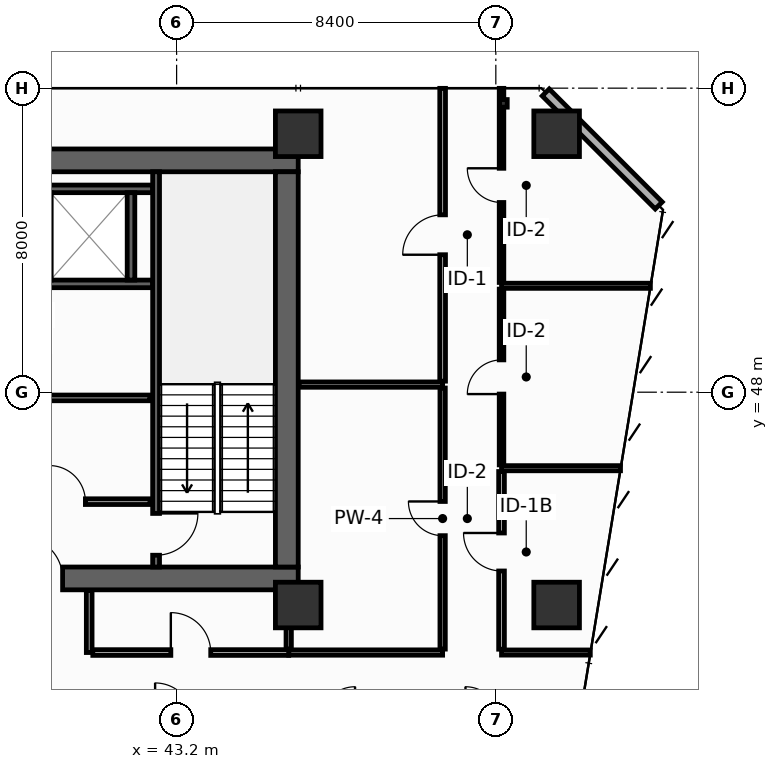
"""IFC4 building model, lengths in metres.
Left out: names, types, materials, properties, quantities, classifications, styles, units other than length and angle.
Written with IfcOpenShell. Run it as: python <this file> out.ifc"""

import sys

from ifc_helpers import new_model, si_unit, direction, frame, frame_2d, origin, origin_2d, place, context, subcontext, project, spatial, rectangle, hollow_rectangle, extrude, element, fill, save


model = new_model("IFC4")
c1 = context("Model", 3, precision=1e-05, world=origin(), true_north=direction((0.0, 1.0)))
c2 = subcontext(c1, "Body", "Model", "MODEL_VIEW")
j1 = project(units=[si_unit("LENGTHUNIT", "METRE"), si_unit("PLANEANGLEUNIT", "RADIAN")], contexts=[c1])
p1 = place(None, origin())
s1 = spatial("IfcSite", under=j1, at=p1, CompositionType="ELEMENT")
p2 = place(p1, origin())
s2 = spatial("IfcBuilding", under=s1, at=p2, CompositionType="ELEMENT")
p3 = place(p2, frame((0.0, 0.0, 56.0)))
s3 = spatial("IfcBuildingStorey", under=s2, at=p3, CompositionType="ELEMENT", Elevation=56.0)
p4 = place(p3, frame((13.5, 43.1, 0.0), z_axis=(0.0, 0.0, 1.0), x_axis=(1.0, 0.0, 0.0)))
e1 = element("IfcWall", 1, at=p4, inside=s3, PredefinedType="SHEAR", context=c2, shape_type="SweptSolid", body=[
    extrude(rectangle(XDim=32.9, YDim=0.6, at=frame_2d((16.45, 0.0))), origin(), (0.0, 0.0, 1.0), 4.15),
])
p5 = place(p4, frame((5.4, 0.0, 0.0)))
e2 = element("IfcOpeningElement", 2, at=p5, cuts=e1, PredefinedType="OPENING", context=c2, shape_type="SweptSolid", body=[
    extrude(rectangle(XDim=1.1, YDim=2.15, at=frame_2d((0.55, 1.075))), frame((0.0, 0.31, 0.0), z_axis=(0.0, -1.0, 0.0), x_axis=(1.0, 0.0, 0.0)), (0.0, 0.0, 1.0), 0.62),
])
p6 = place(p4, frame((25.6, 0.0, 0.0)))
e3 = element("IfcOpeningElement", 3, at=p6, cuts=e1, PredefinedType="OPENING", context=c2, shape_type="SweptSolid", body=[
    extrude(rectangle(XDim=1.1, YDim=2.15, at=frame_2d((0.55, 1.075))), frame((0.0, 0.31, 0.0), z_axis=(0.0, -1.0, 0.0), x_axis=(1.0, 0.0, 0.0)), (0.0, 0.0, 1.0), 0.62),
])
p7 = place(p3, frame((13.5, 54.1, 0.0), z_axis=(0.0, 0.0, 1.0), x_axis=(1.0, 0.0, 0.0)))
e4 = element("IfcWall", 4, at=p7, inside=s3, PredefinedType="SHEAR", context=c2, shape_type="SweptSolid", body=[
    extrude(rectangle(XDim=32.9, YDim=0.6, at=frame_2d((16.45, 0.0))), origin(), (0.0, 0.0, 1.0), 4.15),
])
p8 = place(p3, frame((46.1, 43.4, 0.0), z_axis=(0.0, 0.0, 1.0), x_axis=(0.0, 1.0, 0.0)))
e5 = element("IfcWall", 5, at=p8, inside=s3, PredefinedType="SHEAR", context=c2, shape_type="SweptSolid", body=[
    extrude(rectangle(XDim=10.4, YDim=0.6, at=frame_2d((5.2, 0.0))), origin(), (0.0, 0.0, 1.0), 4.15),
])
for number, where, z_axis, x_axis in (
    (6, (46.4, 54.8, 0.0), (0.0, 0.0, 1.0), (1.0, 0.0, 0.0)),
    (7, (53.2, 54.8, 0.0), (0.0, 0.0, 1.0), (1.0, 0.0, 0.0)),
    (8, (46.4, 42.4, 0.0), (0.0, 0.0, 1.0), (1.0, 0.0, 0.0)),
    (9, (53.2, 42.4, 0.0), (0.0, 0.0, 1.0), (1.0, 0.0, 0.0)),
):
    element("IfcColumn", number, at=place(p3, frame(where, z_axis=z_axis, x_axis=x_axis)), inside=s3, PredefinedType="COLUMN", context=c2, shape_type="SweptSolid", body=[
        extrude(hollow_rectangle(XDim=1.2, YDim=1.2, WallThickness=0.055, at=origin_2d()), origin(), (0.0, 0.0, 1.0), 4.4),
    ])
p9 = place(p3, frame((51.8, 55.6, 0.0), z_axis=(0.0, 0.0, 1.0), x_axis=(1.0, 0.0, 0.0)))
e10 = element("IfcColumn", 10, at=p9, inside=s3, PredefinedType="PILASTER", context=c2, shape_type="SweptSolid", body=[
    extrude(hollow_rectangle(XDim=0.2, YDim=0.2, WallThickness=0.01, at=origin_2d()), origin(), (0.0, 0.0, 1.0), 4.4),
])
for number, where, z_axis, x_axis in (
    (11, (39.525, 50.85, 0.0), (0.0, 0.0, 1.0), (1.0, 0.0, 0.0)),
    (12, (39.525, 53.35, 0.0), (0.0, 0.0, 1.0), (1.0, 0.0, 0.0)),
):
    element("IfcWall", number, at=place(p3, frame(where, z_axis=z_axis, x_axis=x_axis)), inside=s3, PredefinedType="SHEAR", context=c2, shape_type="SweptSolid", body=[
        extrude(rectangle(XDim=3.045, YDim=0.2, at=frame_2d((1.522, 0.0))), origin(), (0.0, 0.0, 1.0), 4.15),
    ])
p10 = place(p3, frame((42.0, 50.95, 0.0), z_axis=(0.0, 0.0, 1.0), x_axis=(0.0, 1.0, 0.0)))
e13 = element("IfcWall", 13, at=p10, inside=s3, PredefinedType="SHEAR", context=c2, shape_type="SweptSolid", body=[
    extrude(rectangle(XDim=2.3, YDim=0.2, at=frame_2d((1.15, 0.0))), origin(), (0.0, 0.0, 1.0), 4.15),
])
p11 = place(p3, frame((42.66, 53.8, 0.0), z_axis=(0.0, 0.0, 1.0), x_axis=(0.0, -1.0, 0.0)))
e14 = element("IfcWall", 14, at=p11, inside=s3, PredefinedType="SHEAR", context=c2, shape_type="SweptSolid", body=[
    extrude(rectangle(XDim=10.4, YDim=0.18, at=frame_2d((5.2, 0.0))), origin(), (0.0, 0.0, 1.0), 4.15),
])
p12 = place(p11, frame((8.99, 0.0, 0.0)))
e15 = element("IfcOpeningElement", 15, at=p12, cuts=e14, PredefinedType="OPENING", context=c2, shape_type="SweptSolid", body=[
    extrude(rectangle(XDim=1.1, YDim=2.15, at=frame_2d((0.55, 1.075))), frame((0.0, 0.1, 0.0), z_axis=(0.0, -1.0, 0.0), x_axis=(1.0, 0.0, 0.0)), (0.0, 0.0, 1.0), 0.2),
])
p13 = place(p3, frame((34.05, 45.12, 0.0), z_axis=(0.0, 0.0, 1.0), x_axis=(1.0, 0.0, 0.0)))
e16 = element("IfcWall", 16, at=p13, inside=s3, PredefinedType="PARTITIONING", context=c2, shape_type="SweptSolid", body=[
    extrude(rectangle(XDim=8.45, YDim=0.15, at=frame_2d((4.225, 0.0))), origin(), (0.0, 0.0, 1.0), 4.15),
])
p14 = place(p13, frame((1.5, 0.0, 0.0)))
e17 = element("IfcOpeningElement", 17, at=p14, cuts=e16, PredefinedType="OPENING", context=c2, shape_type="SweptSolid", body=[
    extrude(rectangle(XDim=0.95, YDim=2.15, at=frame_2d((0.475, 1.075))), frame((0.0, 0.085, 0.0), z_axis=(0.0, -1.0, 0.0), x_axis=(1.0, 0.0, 0.0)), (0.0, 0.0, 1.0), 0.17),
])
p15 = place(p13, frame((5.8, 0.0, 0.0)))
e18 = element("IfcOpeningElement", 18, at=p15, cuts=e16, PredefinedType="OPENING", context=c2, shape_type="SweptSolid", body=[
    extrude(rectangle(XDim=0.95, YDim=2.15, at=frame_2d((0.475, 1.075))), frame((0.0, 0.085, 0.0), z_axis=(0.0, -1.0, 0.0), x_axis=(1.0, 0.0, 0.0)), (0.0, 0.0, 1.0), 0.17),
])
p16 = place(p3, frame((34.05, 47.85, 0.0), z_axis=(0.0, 0.0, 1.0), x_axis=(1.0, 0.0, 0.0)))
e19 = element("IfcWall", 19, at=p16, inside=s3, PredefinedType="PARTITIONING", context=c2, shape_type="SweptSolid", body=[
    extrude(rectangle(XDim=8.45, YDim=0.15, at=frame_2d((4.225, 0.0))), origin(), (0.0, 0.0, 1.0), 4.15),
])
p17 = place(p3, frame((55.887, 52.913, 0.0), z_axis=(0.0, 0.0, 1.0), x_axis=(-0.707106781187, 0.707106781187, 0.0)))
e20 = element("IfcWall", 20, at=p17, inside=s3, PredefinedType="STANDARD", context=c2, shape_type="SweptSolid", body=[
    extrude(rectangle(XDim=4.206, YDim=0.26, at=frame_2d((2.103, 0.0))), origin(), (0.0, 0.0, 1.0), 4.15),
])
p18 = place(p3, frame((46.15, 41.15, 0.0), z_axis=(0.0, 0.0, 1.0), x_axis=(1.0, 0.0, 0.0)))
e21 = element("IfcWall", 21, at=p18, inside=s3, PredefinedType="PARTITIONING", context=c2, shape_type="SweptSolid", body=[
    extrude(rectangle(XDim=4.05, YDim=0.14, at=frame_2d((2.025, 0.0))), origin(), (0.0, 0.0, 1.0), 4.15),
])
p19 = place(p3, frame((46.15, 41.24, 0.0), z_axis=(0.0, 0.0, 1.0), x_axis=(0.0, 1.0, 0.0)))
e22 = element("IfcWall", 22, at=p19, inside=s3, PredefinedType="PARTITIONING", context=c2, shape_type="SweptSolid", body=[
    extrude(rectangle(XDim=1.54, YDim=0.14, at=frame_2d((0.77, 0.0))), origin(), (0.0, 0.0, 1.0), 4.15),
])
p20 = place(p3, frame((46.42, 48.2, 0.0), z_axis=(0.0, 0.0, 1.0), x_axis=(1.0, 0.0, 0.0)))
e23 = element("IfcWall", 23, at=p20, inside=s3, PredefinedType="PARTITIONING", context=c2, shape_type="SweptSolid", body=[
    extrude(rectangle(XDim=3.78, YDim=0.14, at=frame_2d((1.89, 0.0))), origin(), (0.0, 0.0, 1.0), 4.15),
])
p21 = place(p3, frame((50.2, 41.24, 0.0), z_axis=(0.0, 0.0, 1.0), x_axis=(0.0, 1.0, 0.0)))
e24 = element("IfcWall", 24, at=p21, inside=s3, PredefinedType="PARTITIONING", context=c2, shape_type="SweptSolid", body=[
    extrude(rectangle(XDim=6.87, YDim=0.14, at=frame_2d((3.435, 0.0))), origin(), (0.0, 0.0, 1.0), 3.335),
])
p22 = place(p21, frame((2.985, 0.0, 0.0)))
e25 = element("IfcOpeningElement", 25, at=p22, cuts=e24, PredefinedType="OPENING", context=c2, shape_type="SweptSolid", body=[
    extrude(rectangle(XDim=0.9, YDim=2.1, at=frame_2d((0.45, 1.05))), frame((0.0, 0.08, 0.0), z_axis=(0.0, -1.0, 0.0), x_axis=(1.0, 0.0, 0.0)), (0.0, 0.0, 1.0), 0.16),
])
p23 = place(p3, frame((50.2, 48.29, 0.0), z_axis=(0.0, 0.0, 1.0), x_axis=(0.0, 1.0, 0.0)))
e26 = element("IfcWall", 26, at=p23, inside=s3, PredefinedType="PARTITIONING", context=c2, shape_type="SweptSolid", body=[
    extrude(rectangle(XDim=7.705, YDim=0.15, at=frame_2d((3.853, 0.0))), origin(), (0.0, 0.0, 1.0), 3.435),
])
p24 = place(p23, frame((3.327, 0.0, 0.0)))
e27 = element("IfcOpeningElement", 27, at=p24, cuts=e26, PredefinedType="OPENING", context=c2, shape_type="SweptSolid", body=[
    extrude(rectangle(XDim=1.05, YDim=2.15, at=frame_2d((0.525, 1.075))), frame((0.0, 0.085, 0.0), z_axis=(0.0, -1.0, 0.0), x_axis=(1.0, 0.0, 0.0)), (0.0, 0.0, 1.0), 0.17),
])
p25 = place(p3, frame((51.75, 41.15, 0.0), z_axis=(0.0, 0.0, 1.0), x_axis=(1.0, 0.0, 0.0)))
e28 = element("IfcWall", 28, at=p25, inside=s3, PredefinedType="PARTITIONING", context=c2, shape_type="SweptSolid", body=[
    extrude(rectangle(XDim=2.336, YDim=0.135, at=frame_2d((1.168, 0.0))), origin(), (0.0, 0.0, 1.0), 3.635),
])
p26 = place(p3, frame((51.75, 46.0, 0.0), z_axis=(0.0, 0.0, 1.0), x_axis=(1.0, 0.0, 0.0)))
e29 = element("IfcWall", 29, at=p26, inside=s3, PredefinedType="PARTITIONING", context=c2, shape_type="SweptSolid", body=[
    extrude(rectangle(XDim=3.131, YDim=0.135, at=frame_2d((1.565, 0.0))), origin(), (0.0, 0.0, 1.0), 3.335),
])
p27 = place(p3, frame((51.75, 50.8, 0.0), z_axis=(0.0, 0.0, 1.0), x_axis=(1.0, 0.0, 0.0)))
e30 = element("IfcWall", 30, at=p27, inside=s3, PredefinedType="PARTITIONING", context=c2, shape_type="SweptSolid", body=[
    extrude(rectangle(XDim=3.917, YDim=0.135, at=frame_2d((1.958, 0.0))), origin(), (0.0, 0.0, 1.0), 3.335),
])
p28 = place(p3, frame((51.75, 41.238, 0.0), z_axis=(0.0, 0.0, 1.0), x_axis=(0.0, 1.0, 0.0)))
e31 = element("IfcWall", 31, at=p28, inside=s3, PredefinedType="PARTITIONING", context=c2, shape_type="SweptSolid", body=[
    extrude(rectangle(XDim=4.675, YDim=0.15, at=frame_2d((2.337, 0.0))), origin(), (0.0, 0.0, 1.0), 3.335),
])
p29 = place(p28, frame((2.058, 0.0, 0.0)))
e32 = element("IfcOpeningElement", 32, at=p29, cuts=e31, PredefinedType="OPENING", context=c2, shape_type="SweptSolid", body=[
    extrude(rectangle(XDim=1.0, YDim=2.15, at=frame_2d((0.5, 1.075))), frame((0.0, 0.085, 0.0), z_axis=(0.0, -1.0, 0.0), x_axis=(1.0, 0.0, 0.0)), (0.0, 0.0, 1.0), 0.17),
])
p30 = place(p3, frame((51.75, 46.087, 0.0), z_axis=(0.0, 0.0, 1.0), x_axis=(0.0, 1.0, 0.0)))
e33 = element("IfcWall", 33, at=p30, inside=s3, PredefinedType="PARTITIONING", context=c2, shape_type="SweptSolid", body=[
    extrude(rectangle(XDim=4.625, YDim=0.12, at=frame_2d((2.312, 0.0))), origin(), (0.0, 0.0, 1.0), 4.15),
])
p31 = place(p30, frame((1.863, 0.0, 0.0)))
e34 = element("IfcOpeningElement", 34, at=p31, cuts=e33, PredefinedType="OPENING", context=c2, shape_type="SweptSolid", body=[
    extrude(rectangle(XDim=0.9, YDim=2.1, at=frame_2d((0.45, 1.05))), frame((0.0, 0.07, 0.0), z_axis=(0.0, -1.0, 0.0), x_axis=(1.0, 0.0, 0.0)), (0.0, 0.0, 1.0), 0.14),
])
p32 = place(p3, frame((51.75, 50.887, 0.0), z_axis=(0.0, 0.0, 1.0), x_axis=(0.0, 1.0, 0.0)))
e35 = element("IfcWall", 35, at=p32, inside=s3, PredefinedType="PARTITIONING", context=c2, shape_type="SweptSolid", body=[
    extrude(rectangle(XDim=5.108, YDim=0.12, at=frame_2d((2.554, 0.0))), origin(), (0.0, 0.0, 1.0), 3.435),
])
p33 = place(p32, frame((2.104, 0.0, 0.0)))
e36 = element("IfcOpeningElement", 36, at=p33, cuts=e35, PredefinedType="OPENING", context=c2, shape_type="SweptSolid", body=[
    extrude(rectangle(XDim=0.9, YDim=2.1, at=frame_2d((0.45, 1.05))), frame((0.0, 0.07, 0.0), z_axis=(0.0, -1.0, 0.0), x_axis=(1.0, 0.0, 0.0)), (0.0, 0.0, 1.0), 0.14),
])
p34 = place(p3, frame((40.9, 41.15, 0.0), z_axis=(0.0, 0.0, 1.0), x_axis=(0.0, 1.0, 0.0)))
e37 = element("IfcWall", 37, at=p34, inside=s3, PredefinedType="PARTITIONING", context=c2, shape_type="SweptSolid", body=[
    extrude(rectangle(XDim=1.63, YDim=0.15, at=frame_2d((0.815, 0.0))), origin(), (0.0, 0.0, 1.0), 4.15),
])
p35 = place(p3, frame((40.995, 41.15, 0.0), z_axis=(0.0, 0.0, 1.0), x_axis=(1.0, 0.0, 0.0)))
e38 = element("IfcWall", 38, at=p35, inside=s3, PredefinedType="PARTITIONING", context=c2, shape_type="SweptSolid", body=[
    extrude(rectangle(XDim=5.155, YDim=0.15, at=frame_2d((2.577, 0.0))), origin(), (0.0, 0.0, 1.0), 4.15),
])
p36 = place(p35, frame((2.053, 0.0, 0.0)))
e39 = element("IfcOpeningElement", 39, at=p36, cuts=e38, PredefinedType="OPENING", context=c2, shape_type="SweptSolid", body=[
    extrude(rectangle(XDim=1.05, YDim=2.15, at=frame_2d((0.525, 1.075))), frame((0.0, 0.085, 0.0), z_axis=(0.0, -1.0, 0.0), x_axis=(1.0, 0.0, 0.0)), (0.0, 0.0, 1.0), 0.17),
])
p37 = place(p12, origin())
e40 = element("IfcDoor", 40, at=p37, inside=s3, OperationType="SINGLE_SWING_LEFT", PredefinedType="DOOR", context=c2, shape_type="SweptSolid", body=[
    extrude(rectangle(XDim=1.1, YDim=2.15, at=frame_2d((0.55, 1.075))), frame((0.0, 0.025, 0.0), z_axis=(0.0, -1.0, 0.0), x_axis=(1.0, 0.0, 0.0)), (0.0, 0.0, 1.0), 0.05),
])
fill(e15, e40)
p38 = place(p6, origin())
e41 = element("IfcDoor", 41, at=p38, inside=s3, OperationType="SINGLE_SWING_LEFT", PredefinedType="DOOR", context=c2, shape_type="SweptSolid", body=[
    extrude(rectangle(XDim=1.1, YDim=2.15, at=frame_2d((0.55, 1.075))), frame((0.0, 0.025, 0.0), z_axis=(0.0, -1.0, 0.0), x_axis=(1.0, 0.0, 0.0)), (0.0, 0.0, 1.0), 0.05),
])
fill(e3, e41)
p39 = place(p15, origin())
e42 = element("IfcDoor", 42, at=p39, inside=s3, OperationType="SINGLE_SWING_LEFT", PredefinedType="DOOR", context=c2, shape_type="SweptSolid", body=[
    extrude(rectangle(XDim=0.95, YDim=2.15, at=frame_2d((0.475, 1.075))), frame((0.0, 0.025, 0.0), z_axis=(0.0, -1.0, 0.0), x_axis=(1.0, 0.0, 0.0)), (0.0, 0.0, 1.0), 0.05),
])
fill(e18, e42)
p40 = place(p22, origin())
e43 = element("IfcDoor", 43, at=p40, inside=s3, OperationType="SINGLE_SWING_RIGHT", PredefinedType="DOOR", context=c2, shape_type="SweptSolid", body=[
    extrude(rectangle(XDim=0.9, YDim=2.1, at=frame_2d((0.45, 1.05))), frame((0.0, 0.025, 0.0), z_axis=(0.0, -1.0, 0.0), x_axis=(1.0, 0.0, 0.0)), (0.0, 0.0, 1.0), 0.05),
])
fill(e25, e43)
p41 = place(p24, origin())
e44 = element("IfcDoor", 44, at=p41, inside=s3, OperationType="SINGLE_SWING_LEFT", PredefinedType="DOOR", context=c2, shape_type="SweptSolid", body=[
    extrude(rectangle(XDim=1.05, YDim=2.15, at=frame_2d((0.525, 1.075))), frame((0.0, 0.025, 0.0), z_axis=(0.0, -1.0, 0.0), x_axis=(1.0, 0.0, 0.0)), (0.0, 0.0, 1.0), 0.05),
])
fill(e27, e44)
p42 = place(p29, origin())
e45 = element("IfcDoor", 45, at=p42, inside=s3, OperationType="SINGLE_SWING_RIGHT", PredefinedType="DOOR", context=c2, shape_type="SweptSolid", body=[
    extrude(rectangle(XDim=1.0, YDim=2.15, at=frame_2d((0.5, 1.075))), frame((0.0, 0.025, 0.0), z_axis=(0.0, -1.0, 0.0), x_axis=(1.0, 0.0, 0.0)), (0.0, 0.0, 1.0), 0.05),
])
fill(e32, e45)
p43 = place(p31, origin())
e46 = element("IfcDoor", 46, at=p43, inside=s3, OperationType="SINGLE_SWING_LEFT", PredefinedType="DOOR", context=c2, shape_type="SweptSolid", body=[
    extrude(rectangle(XDim=0.9, YDim=2.1, at=frame_2d((0.45, 1.05))), frame((0.0, 0.025, 0.0), z_axis=(0.0, -1.0, 0.0), x_axis=(1.0, 0.0, 0.0)), (0.0, 0.0, 1.0), 0.05),
])
fill(e34, e46)
p44 = place(p33, origin())
e47 = element("IfcDoor", 47, at=p44, inside=s3, OperationType="SINGLE_SWING_RIGHT", PredefinedType="DOOR", context=c2, shape_type="SweptSolid", body=[
    extrude(rectangle(XDim=0.9, YDim=2.1, at=frame_2d((0.45, 1.05))), frame((0.0, 0.025, 0.0), z_axis=(0.0, -1.0, 0.0), x_axis=(1.0, 0.0, 0.0)), (0.0, 0.0, 1.0), 0.05),
])
fill(e36, e47)
p45 = place(p36, origin())
e48 = element("IfcDoor", 48, at=p45, inside=s3, OperationType="SINGLE_SWING_LEFT", PredefinedType="DOOR", context=c2, shape_type="SweptSolid", body=[
    extrude(rectangle(XDim=1.05, YDim=2.15, at=frame_2d((0.525, 1.075))), frame((0.0, 0.025, 0.0), z_axis=(0.0, -1.0, 0.0), x_axis=(1.0, 0.0, 0.0)), (0.0, 0.0, 1.0), 0.05),
])
fill(e39, e48)
save(model, sys.argv[1])
